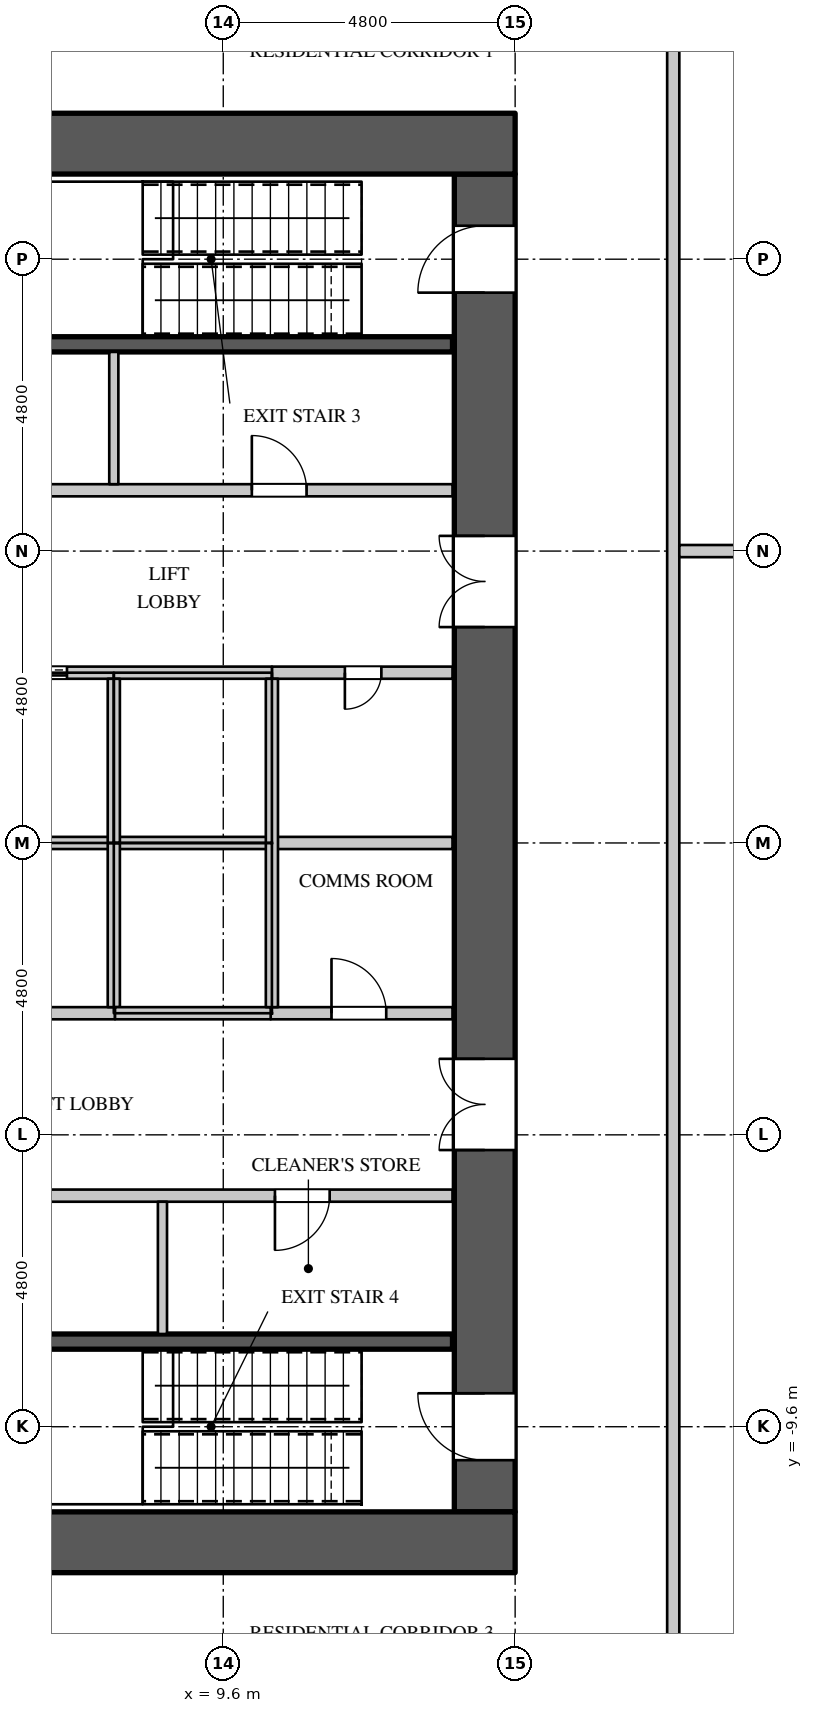
"""IFC4 building model, lengths in metres.
Left out: names, types, materials, properties, quantities, classifications, styles, units other than length and angle.
Written with IfcOpenShell. Run it as: python <this file> out.ifc"""

import sys

from ifc_helpers import new_model, si_unit, direction, frame, frame_2d, origin, place, context, subcontext, project, spatial, rectangle, extrude, element, fill, save


model = new_model("IFC4")
c1 = context("Model", 3, precision=1e-05, world=origin(), true_north=direction((0.0, 1.0)))
c2 = subcontext(c1, "Body", "Model", "MODEL_VIEW")
j1 = project(units=[si_unit("LENGTHUNIT", "METRE"), si_unit("PLANEANGLEUNIT", "RADIAN")], contexts=[c1])
p1 = place(None, origin())
s1 = spatial("IfcSite", under=j1, at=p1, CompositionType="ELEMENT")
p2 = place(p1, origin())
s2 = spatial("IfcBuilding", under=s1, at=p2, CompositionType="ELEMENT")
p3 = place(p2, frame((0.0, 0.0, 80.1)))
s3 = spatial("IfcBuildingStorey", under=s2, at=p3, CompositionType="ELEMENT", Elevation=80.1)
for number, where, z_axis, x_axis in (
    (1, (-14.4, 11.5, 0.0), (0.0, 0.0, 1.0), (1.0, 0.0, 0.0)),
    (2, (-14.4, -11.5, 0.0), (0.0, 0.0, 1.0), (1.0, 0.0, 0.0)),
):
    element("IfcWall", number, at=place(p3, frame(where, z_axis=z_axis, x_axis=x_axis)), inside=s3, PredefinedType="SHEAR", context=c2, shape_type="SweptSolid", body=[
        extrude(rectangle(XDim=28.8, YDim=1.0, at=frame_2d((14.4, 0.0))), origin(), (0.0, 0.0, 1.0), 4.2),
    ])
p4 = place(p3, frame((13.9, -11.0, 0.0), z_axis=(0.0, 0.0, 1.0), x_axis=(0.0, 1.0, 0.0)))
e3 = element("IfcWall", 3, at=p4, inside=s3, PredefinedType="SHEAR", context=c2, shape_type="SweptSolid", body=[
    extrude(rectangle(XDim=22.0, YDim=1.0, at=frame_2d((11.0, 0.0))), origin(), (0.0, 0.0, 1.0), 4.2),
])
p5 = place(p4, frame((20.05, 0.0, 0.0)))
e4 = element("IfcOpeningElement", 4, at=p5, cuts=e3, PredefinedType="OPENING", context=c2, shape_type="SweptSolid", body=[
    extrude(rectangle(XDim=1.1, YDim=2.2, at=frame_2d((0.55, 1.1))), frame((0.0, 0.51, 0.0), z_axis=(0.0, -1.0, 0.0), x_axis=(1.0, 0.0, 0.0)), (0.0, 0.0, 1.0), 1.02),
])
p6 = place(p4, frame((0.85, 0.0, 0.0)))
e5 = element("IfcOpeningElement", 5, at=p6, cuts=e3, PredefinedType="OPENING", context=c2, shape_type="SweptSolid", body=[
    extrude(rectangle(XDim=1.1, YDim=2.2, at=frame_2d((0.55, 1.1))), frame((0.0, 0.51, 0.0), z_axis=(0.0, -1.0, 0.0), x_axis=(1.0, 0.0, 0.0)), (0.0, 0.0, 1.0), 1.02),
])
p7 = place(p4, frame((14.55, 0.0, 0.0)))
e6 = element("IfcOpeningElement", 6, at=p7, cuts=e3, PredefinedType="OPENING", context=c2, shape_type="SweptSolid", body=[
    extrude(rectangle(XDim=1.5, YDim=2.4, at=frame_2d((0.75, 1.2))), frame((0.0, 0.51, 0.0), z_axis=(0.0, -1.0, 0.0), x_axis=(1.0, 0.0, 0.0)), (0.0, 0.0, 1.0), 1.02),
])
p8 = place(p4, frame((5.95, 0.0, 0.0)))
e7 = element("IfcOpeningElement", 7, at=p8, cuts=e3, PredefinedType="OPENING", context=c2, shape_type="SweptSolid", body=[
    extrude(rectangle(XDim=1.5, YDim=2.4, at=frame_2d((0.75, 1.2))), frame((0.0, 0.51, 0.0), z_axis=(0.0, -1.0, 0.0), x_axis=(1.0, 0.0, 0.0)), (0.0, 0.0, 1.0), 1.02),
])
p9 = place(p3, frame((-7.7, -5.8, 0.0), z_axis=(0.0, 0.0, 1.0), x_axis=(1.0, 0.0, 0.0)))
e8 = element("IfcWall", 8, at=p9, inside=s3, PredefinedType="PARTITIONING", context=c2, shape_type="SweptSolid", body=[
    extrude(rectangle(XDim=21.07, YDim=0.2, at=frame_2d((10.535, 0.0))), origin(), (0.0, 0.0, 1.0), 3.95),
])
p10 = place(p9, frame((1.35, 0.0, 0.0)))
e9 = element("IfcOpeningElement", 9, at=p10, cuts=e8, PredefinedType="OPENING", context=c2, shape_type="SweptSolid", body=[
    extrude(rectangle(XDim=0.9, YDim=2.2, at=frame_2d((0.45, 1.1))), frame((0.0, 0.11, 0.0), z_axis=(0.0, -1.0, 0.0), x_axis=(1.0, 0.0, 0.0)), (0.0, 0.0, 1.0), 0.22),
])
p11 = place(p9, frame((5.75, 0.0, 0.0)))
e10 = element("IfcOpeningElement", 10, at=p11, cuts=e8, PredefinedType="OPENING", context=c2, shape_type="SweptSolid", body=[
    extrude(rectangle(XDim=0.9, YDim=2.2, at=frame_2d((0.45, 1.1))), frame((0.0, 0.11, 0.0), z_axis=(0.0, -1.0, 0.0), x_axis=(1.0, 0.0, 0.0)), (0.0, 0.0, 1.0), 0.22),
])
p12 = place(p9, frame((12.1, 0.0, 0.0)))
e11 = element("IfcOpeningElement", 11, at=p12, cuts=e8, PredefinedType="OPENING", context=c2, shape_type="SweptSolid", body=[
    extrude(rectangle(XDim=0.9, YDim=2.2, at=frame_2d((0.45, 1.1))), frame((0.0, 0.11, 0.0), z_axis=(0.0, -1.0, 0.0), x_axis=(1.0, 0.0, 0.0)), (0.0, 0.0, 1.0), 0.22),
])
p13 = place(p9, frame((18.15, 0.0, 0.0)))
e12 = element("IfcOpeningElement", 12, at=p13, cuts=e8, PredefinedType="OPENING", context=c2, shape_type="SweptSolid", body=[
    extrude(rectangle(XDim=0.9, YDim=2.2, at=frame_2d((0.45, 1.1))), frame((0.0, 0.11, 0.0), z_axis=(0.0, -1.0, 0.0), x_axis=(1.0, 0.0, 0.0)), (0.0, 0.0, 1.0), 0.22),
])
p14 = place(p3, frame((-1.62, -2.8, 0.0), z_axis=(0.0, 0.0, 1.0), x_axis=(1.0, 0.0, 0.0)))
e13 = element("IfcWall", 13, at=p14, inside=s3, PredefinedType="PARTITIONING", context=c2, shape_type="SweptSolid", body=[
    extrude(rectangle(XDim=9.44, YDim=0.2, at=frame_2d((4.72, 0.0))), origin(), (0.0, 0.0, 1.0), 3.95),
])
p15 = place(p14, frame((4.25, 0.0, 0.0)))
e14 = element("IfcOpeningElement", 14, at=p15, cuts=e13, PredefinedType="OPENING", context=c2, shape_type="SweptSolid", body=[
    extrude(rectangle(XDim=0.9, YDim=2.2, at=frame_2d((0.45, 1.1))), frame((0.0, 0.11, 0.0), z_axis=(0.0, -1.0, 0.0), x_axis=(1.0, 0.0, 0.0)), (0.0, 0.0, 1.0), 0.22),
])
p16 = place(p3, frame((4.62, 5.8, 0.0), z_axis=(0.0, 0.0, 1.0), x_axis=(1.0, 0.0, 0.0)))
e15 = element("IfcWall", 15, at=p16, inside=s3, PredefinedType="PARTITIONING", context=c2, shape_type="SweptSolid", body=[
    extrude(rectangle(XDim=8.75, YDim=0.2, at=frame_2d((4.375, 0.0))), origin(), (0.0, 0.0, 1.0), 3.95),
])
p17 = place(p16, frame((1.2, 0.0, 0.0)))
e16 = element("IfcOpeningElement", 16, at=p17, cuts=e15, PredefinedType="OPENING", context=c2, shape_type="SweptSolid", body=[
    extrude(rectangle(XDim=0.9, YDim=2.2, at=frame_2d((0.45, 1.1))), frame((0.0, 0.11, 0.0), z_axis=(0.0, -1.0, 0.0), x_axis=(1.0, 0.0, 0.0)), (0.0, 0.0, 1.0), 0.22),
])
p18 = place(p16, frame((5.45, 0.0, 0.0)))
e17 = element("IfcOpeningElement", 17, at=p18, cuts=e15, PredefinedType="OPENING", context=c2, shape_type="SweptSolid", body=[
    extrude(rectangle(XDim=0.9, YDim=2.2, at=frame_2d((0.45, 1.1))), frame((0.0, 0.11, 0.0), z_axis=(0.0, -1.0, 0.0), x_axis=(1.0, 0.0, 0.0)), (0.0, 0.0, 1.0), 0.22),
])
p19 = place(p3, frame((17.0, -14.5, 0.0), z_axis=(0.0, 0.0, 1.0), x_axis=(0.0, 1.0, 0.0)))
e18 = element("IfcWall", 18, at=p19, inside=s3, PredefinedType="PARTITIONING", context=c2, shape_type="SweptSolid", body=[
    extrude(rectangle(XDim=29.0, YDim=0.2, at=frame_2d((14.5, 0.0))), origin(), (0.0, 0.0, 1.0), 3.95),
])
for number, where, z_axis, x_axis in (
    (19, (7.8, 5.9, 0.0), (0.0, 0.0, 1.0), (0.0, 1.0, 0.0)),
    (20, (8.6, -8.075, 0.0), (0.0, 0.0, 1.0), (0.0, 1.0, 0.0)),
):
    element("IfcWall", number, at=place(p3, frame(where, z_axis=z_axis, x_axis=x_axis)), inside=s3, PredefinedType="PARTITIONING", context=c2, shape_type="SweptSolid", body=[
        extrude(rectangle(XDim=2.175, YDim=0.15, at=frame_2d((1.087, 0.0))), origin(), (0.0, 0.0, 1.0), 3.95),
    ])
p20 = place(p3, frame((16.02, -19.26, 0.0), z_axis=(0.0, 0.0, 1.0), x_axis=(0.707106781187, 0.707106781187, 0.0)))
e21 = element("IfcWall", 21, at=p20, inside=s3, PredefinedType="PARTITIONING", context=c2, shape_type="SweptSolid", body=[
    extrude(rectangle(XDim=10.229, YDim=0.15, at=frame_2d((5.114, 0.0))), origin(), (0.0, 0.0, 1.0), 3.95),
])
p21 = place(p20, frame((4.3, 0.0, 0.0)))
e22 = element("IfcOpeningElement", 22, at=p21, cuts=e21, PredefinedType="OPENING", context=c2, shape_type="SweptSolid", body=[
    extrude(rectangle(XDim=0.95, YDim=2.2, at=frame_2d((0.475, 1.1))), frame((0.0, 0.085, 0.0), z_axis=(0.0, -1.0, 0.0), x_axis=(1.0, 0.0, 0.0)), (0.0, 0.0, 1.0), 0.17),
])
p22 = place(p20, frame((0.6, 0.0, 0.0)))
e23 = element("IfcOpeningElement", 23, at=p22, cuts=e21, PredefinedType="OPENING", context=c2, shape_type="SweptSolid", body=[
    extrude(rectangle(XDim=0.95, YDim=2.2, at=frame_2d((0.475, 1.1))), frame((0.0, 0.085, 0.0), z_axis=(0.0, -1.0, 0.0), x_axis=(1.0, 0.0, 0.0)), (0.0, 0.0, 1.0), 0.17),
])
p23 = place(p20, frame((9.1, 0.0, 0.0)))
e24 = element("IfcOpeningElement", 24, at=p23, cuts=e21, PredefinedType="OPENING", context=c2, shape_type="SweptSolid", body=[
    extrude(rectangle(XDim=0.95, YDim=2.2, at=frame_2d((0.475, 1.1))), frame((0.0, 0.085, 0.0), z_axis=(0.0, -1.0, 0.0), x_axis=(1.0, 0.0, 0.0)), (0.0, 0.0, 1.0), 0.17),
])
p24 = place(p3, frame((17.552, 17.446, 0.0), z_axis=(0.0, 0.0, 1.0), x_axis=(0.707106781187, -0.707106781187, 0.0)))
e25 = element("IfcWall", 25, at=p24, inside=s3, PredefinedType="PARTITIONING", context=c2, shape_type="SweptSolid", body=[
    extrude(rectangle(XDim=7.78, YDim=0.15, at=frame_2d((3.89, 0.0))), origin(), (0.0, 0.0, 1.0), 3.95),
])
p25 = place(p24, frame((2.05, 0.0, 0.0)))
e26 = element("IfcOpeningElement", 26, at=p25, cuts=e25, PredefinedType="OPENING", context=c2, shape_type="SweptSolid", body=[
    extrude(rectangle(XDim=0.95, YDim=2.2, at=frame_2d((0.475, 1.1))), frame((0.0, 0.085, 0.0), z_axis=(0.0, -1.0, 0.0), x_axis=(1.0, 0.0, 0.0)), (0.0, 0.0, 1.0), 0.17),
])
p26 = place(p24, frame((6.65, 0.0, 0.0)))
e27 = element("IfcOpeningElement", 27, at=p26, cuts=e25, PredefinedType="OPENING", context=c2, shape_type="SweptSolid", body=[
    extrude(rectangle(XDim=0.95, YDim=2.2, at=frame_2d((0.475, 1.1))), frame((0.0, 0.085, 0.0), z_axis=(0.0, -1.0, 0.0), x_axis=(1.0, 0.0, 0.0)), (0.0, 0.0, 1.0), 0.17),
])
p27 = place(p3, frame((17.1, 4.8, 0.0), z_axis=(0.0, 0.0, 1.0), x_axis=(1.0, 0.0, 0.0)))
e28 = element("IfcWall", 28, at=p27, inside=s3, PredefinedType="PARTITIONING", context=c2, shape_type="SweptSolid", body=[
    extrude(rectangle(XDim=10.8, YDim=0.2, at=frame_2d((5.4, 0.0))), origin(), (0.0, 0.0, 1.0), 3.25),
])
p28 = place(p3, frame((10.38, -2.8, 0.0), z_axis=(0.0, 0.0, 1.0), x_axis=(1.0, 0.0, 0.0)))
e29 = element("IfcWall", 29, at=p28, inside=s3, PredefinedType="PARTITIONING", context=c2, shape_type="SweptSolid", body=[
    extrude(rectangle(XDim=2.99, YDim=0.2, at=frame_2d((1.495, 0.0))), origin(), (0.0, 0.0, 1.0), 3.95),
])
p29 = place(p28, frame((1.0, 0.0, 0.0)))
e30 = element("IfcOpeningElement", 30, at=p29, cuts=e29, PredefinedType="OPENING", context=c2, shape_type="SweptSolid", body=[
    extrude(rectangle(XDim=0.9, YDim=2.2, at=frame_2d((0.45, 1.1))), frame((0.0, 0.11, 0.0), z_axis=(0.0, -1.0, 0.0), x_axis=(1.0, 0.0, 0.0)), (0.0, 0.0, 1.0), 0.22),
])
p30 = place(p3, frame((10.4, 2.8, 0.0), z_axis=(0.0, 0.0, 1.0), x_axis=(1.0, 0.0, 0.0)))
e31 = element("IfcWall", 31, at=p30, inside=s3, PredefinedType="PARTITIONING", context=c2, shape_type="SweptSolid", body=[
    extrude(rectangle(XDim=2.97, YDim=0.2, at=frame_2d((1.485, 0.0))), origin(), (0.0, 0.0, 1.0), 3.95),
])
p31 = place(p30, frame((1.2, 0.0, 0.0)))
e32 = element("IfcOpeningElement", 32, at=p31, cuts=e31, PredefinedType="OPENING", context=c2, shape_type="SweptSolid", body=[
    extrude(rectangle(XDim=0.6, YDim=2.0, at=frame_2d((0.3, 1.0))), frame((0.0, 0.11, 0.0), z_axis=(0.0, -1.0, 0.0), x_axis=(1.0, 0.0, 0.0)), (0.0, 0.0, 1.0), 0.22),
])
p32 = place(p3, frame((10.4, 0.0, 0.0), z_axis=(0.0, 0.0, 1.0), x_axis=(1.0, 0.0, 0.0)))
e33 = element("IfcWall", 33, at=p32, inside=s3, PredefinedType="PARTITIONING", context=c2, shape_type="SweptSolid", body=[
    extrude(rectangle(XDim=2.97, YDim=0.2, at=frame_2d((1.485, 0.0))), origin(), (0.0, 0.0, 1.0), 3.95),
])
p33 = place(p3, frame((-13.37, 0.0, 0.0), z_axis=(0.0, 0.0, 1.0), x_axis=(1.0, 0.0, 0.0)))
e34 = element("IfcWall", 34, at=p33, inside=s3, PredefinedType="PARTITIONING", context=c2, shape_type="SweptSolid", body=[
    extrude(rectangle(XDim=23.77, YDim=0.2, at=frame_2d((11.885, 0.0))), origin(), (0.0, 0.0, 1.0), 3.95),
])
p34 = place(p3, frame((-13.37, 2.8, 0.0), z_axis=(0.0, 0.0, 1.0), x_axis=(1.0, 0.0, 0.0)))
e35 = element("IfcWall", 35, at=p34, inside=s3, PredefinedType="PARTITIONING", context=c2, shape_type="SweptSolid", body=[
    extrude(rectangle(XDim=23.77, YDim=0.2, at=frame_2d((11.885, 0.0))), origin(), (0.0, 0.0, 1.0), 3.95),
])
p35 = place(p34, frame((0.9, 0.0, 0.0)))
e36 = element("IfcOpeningElement", 36, at=p35, cuts=e35, PredefinedType="OPENING", context=c2, shape_type="SweptSolid", body=[
    extrude(rectangle(XDim=1.1, YDim=2.2, at=frame_2d((0.55, 1.1))), frame((0.0, 0.11, 0.0), z_axis=(0.0, -1.0, 0.0), x_axis=(1.0, 0.0, 0.0)), (0.0, 0.0, 1.0), 0.22),
])
p36 = place(p34, frame((3.7, 0.0, 0.0)))
e37 = element("IfcOpeningElement", 37, at=p36, cuts=e35, PredefinedType="OPENING", context=c2, shape_type="SweptSolid", body=[
    extrude(rectangle(XDim=1.1, YDim=2.2, at=frame_2d((0.55, 1.1))), frame((0.0, 0.11, 0.0), z_axis=(0.0, -1.0, 0.0), x_axis=(1.0, 0.0, 0.0)), (0.0, 0.0, 1.0), 0.22),
])
p37 = place(p34, frame((6.3, 0.0, 0.0)))
e38 = element("IfcOpeningElement", 38, at=p37, cuts=e35, PredefinedType="OPENING", context=c2, shape_type="SweptSolid", body=[
    extrude(rectangle(XDim=1.1, YDim=2.2, at=frame_2d((0.55, 1.1))), frame((0.0, 0.11, 0.0), z_axis=(0.0, -1.0, 0.0), x_axis=(1.0, 0.0, 0.0)), (0.0, 0.0, 1.0), 0.22),
])
p38 = place(p34, frame((8.9, 0.0, 0.0)))
e39 = element("IfcOpeningElement", 39, at=p38, cuts=e35, PredefinedType="OPENING", context=c2, shape_type="SweptSolid", body=[
    extrude(rectangle(XDim=1.1, YDim=2.2, at=frame_2d((0.55, 1.1))), frame((0.0, 0.11, 0.0), z_axis=(0.0, -1.0, 0.0), x_axis=(1.0, 0.0, 0.0)), (0.0, 0.0, 1.0), 0.22),
])
p39 = place(p34, frame((11.5, 0.0, 0.0)))
e40 = element("IfcOpeningElement", 40, at=p39, cuts=e35, PredefinedType="OPENING", context=c2, shape_type="SweptSolid", body=[
    extrude(rectangle(XDim=1.1, YDim=2.2, at=frame_2d((0.55, 1.1))), frame((0.0, 0.11, 0.0), z_axis=(0.0, -1.0, 0.0), x_axis=(1.0, 0.0, 0.0)), (0.0, 0.0, 1.0), 0.22),
])
p40 = place(p34, frame((14.1, 0.0, 0.0)))
e41 = element("IfcOpeningElement", 41, at=p40, cuts=e35, PredefinedType="OPENING", context=c2, shape_type="SweptSolid", body=[
    extrude(rectangle(XDim=1.1, YDim=2.2, at=frame_2d((0.55, 1.1))), frame((0.0, 0.11, 0.0), z_axis=(0.0, -1.0, 0.0), x_axis=(1.0, 0.0, 0.0)), (0.0, 0.0, 1.0), 0.22),
])
p41 = place(p34, frame((16.7, 0.0, 0.0)))
e42 = element("IfcOpeningElement", 42, at=p41, cuts=e35, PredefinedType="OPENING", context=c2, shape_type="SweptSolid", body=[
    extrude(rectangle(XDim=1.1, YDim=2.2, at=frame_2d((0.55, 1.1))), frame((0.0, 0.11, 0.0), z_axis=(0.0, -1.0, 0.0), x_axis=(1.0, 0.0, 0.0)), (0.0, 0.0, 1.0), 0.22),
])
p42 = place(p34, frame((19.3, 0.0, 0.0)))
e43 = element("IfcOpeningElement", 43, at=p42, cuts=e35, PredefinedType="OPENING", context=c2, shape_type="SweptSolid", body=[
    extrude(rectangle(XDim=1.1, YDim=2.2, at=frame_2d((0.55, 1.1))), frame((0.0, 0.11, 0.0), z_axis=(0.0, -1.0, 0.0), x_axis=(1.0, 0.0, 0.0)), (0.0, 0.0, 1.0), 0.22),
])
p43 = place(p3, frame((7.8, -2.7, 0.0), z_axis=(0.0, 0.0, 1.0), x_axis=(0.0, 1.0, 0.0)))
e44 = element("IfcWall", 44, at=p43, inside=s3, PredefinedType="PARTITIONING", context=c2, shape_type="SweptSolid", body=[
    extrude(rectangle(XDim=2.7, YDim=0.2, at=frame_2d((1.35, 0.0))), origin(), (0.0, 0.0, 1.0), 3.95),
])
p44 = place(p3, frame((7.82, -2.8, 0.0), z_axis=(0.0, 0.0, 1.0), x_axis=(1.0, 0.0, 0.0)))
e45 = element("IfcWall", 45, at=p44, inside=s3, PredefinedType="PARTITIONING", context=c2, shape_type="SweptSolid", body=[
    extrude(rectangle(XDim=2.56, YDim=0.2, at=frame_2d((1.28, 0.0))), origin(), (0.0, 0.0, 1.0), 3.95),
])
p45 = place(p3, frame((7.8, 0.0, 0.0), z_axis=(0.0, 0.0, 1.0), x_axis=(0.0, 1.0, 0.0)))
e46 = element("IfcWall", 46, at=p45, inside=s3, PredefinedType="PARTITIONING", context=c2, shape_type="SweptSolid", body=[
    extrude(rectangle(XDim=2.7, YDim=0.2, at=frame_2d((1.35, 0.0))), origin(), (0.0, 0.0, 1.0), 3.95),
])
p46 = place(p3, frame((10.4, -2.7, 0.0), z_axis=(0.0, 0.0, 1.0), x_axis=(0.0, 1.0, 0.0)))
e47 = element("IfcWall", 47, at=p46, inside=s3, PredefinedType="PARTITIONING", context=c2, shape_type="SweptSolid", body=[
    extrude(rectangle(XDim=5.4, YDim=0.2, at=frame_2d((2.7, 0.0))), origin(), (0.0, 0.0, 1.0), 3.95),
])
for number, where, z_axis, x_axis in (
    (48, (5.275, -8.2, 0.0), (0.0, 0.0, 1.0), (1.0, 0.0, 0.0)),
    (49, (5.275, 8.2, 0.0), (0.0, 0.0, 1.0), (1.0, 0.0, 0.0)),
):
    element("IfcWall", number, at=place(p3, frame(where, z_axis=z_axis, x_axis=x_axis)), inside=s3, PredefinedType="SHEAR", context=c2, shape_type="SweptSolid", body=[
        extrude(rectangle(XDim=8.095, YDim=0.25, at=frame_2d((4.048, 0.0))), origin(), (0.0, 0.0, 1.0), 3.95),
    ])
p47 = place(p31, origin())
e50 = element("IfcDoor", 50, at=p47, inside=s3, OperationType="SINGLE_SWING_RIGHT", PredefinedType="DOOR", context=c2, shape_type="SweptSolid", body=[
    extrude(rectangle(XDim=0.6, YDim=2.0, at=frame_2d((0.3, 1.0))), frame((0.0, 0.025, 0.0), z_axis=(0.0, -1.0, 0.0), x_axis=(1.0, 0.0, 0.0)), (0.0, 0.0, 1.0), 0.05),
])
fill(e32, e50)
p48 = place(p29, origin())
e51 = element("IfcDoor", 51, at=p48, inside=s3, OperationType="SINGLE_SWING_LEFT", PredefinedType="DOOR", context=c2, shape_type="SweptSolid", body=[
    extrude(rectangle(XDim=0.9, YDim=2.2, at=frame_2d((0.45, 1.1))), frame((0.0, 0.025, 0.0), z_axis=(0.0, -1.0, 0.0), x_axis=(1.0, 0.0, 0.0)), (0.0, 0.0, 1.0), 0.05),
])
fill(e30, e51)
p49 = place(p18, origin())
e52 = element("IfcDoor", 52, at=p49, inside=s3, OperationType="SINGLE_SWING_LEFT", PredefinedType="DOOR", context=c2, shape_type="SweptSolid", body=[
    extrude(rectangle(XDim=0.9, YDim=2.2, at=frame_2d((0.45, 1.1))), frame((0.0, 0.025, 0.0), z_axis=(0.0, -1.0, 0.0), x_axis=(1.0, 0.0, 0.0)), (0.0, 0.0, 1.0), 0.05),
])
fill(e17, e52)
p50 = place(p13, origin())
e53 = element("IfcDoor", 53, at=p50, inside=s3, OperationType="SINGLE_SWING_RIGHT", PredefinedType="DOOR", context=c2, shape_type="SweptSolid", body=[
    extrude(rectangle(XDim=0.9, YDim=2.2, at=frame_2d((0.45, 1.1))), frame((0.0, 0.025, 0.0), z_axis=(0.0, -1.0, 0.0), x_axis=(1.0, 0.0, 0.0)), (0.0, 0.0, 1.0), 0.05),
])
fill(e12, e53)
p51 = place(p42, origin())
e54 = element("IfcDoor", 54, at=p51, inside=s3, OperationType="DOUBLE_DOOR_SLIDING", PredefinedType="DOOR", context=c2, shape_type="SweptSolid", body=[
    extrude(rectangle(XDim=1.1, YDim=2.2, at=frame_2d((0.55, 1.1))), frame((0.0, 0.025, 0.0), z_axis=(0.0, -1.0, 0.0), x_axis=(1.0, 0.0, 0.0)), (0.0, 0.0, 1.0), 0.05),
])
fill(e43, e54)
p52 = place(p5, origin())
e55 = element("IfcDoor", 55, at=p52, inside=s3, OperationType="SINGLE_SWING_LEFT", PredefinedType="DOOR", context=c2, shape_type="SweptSolid", body=[
    extrude(rectangle(XDim=1.1, YDim=2.2, at=frame_2d((0.55, 1.1))), frame((0.0, 0.495, 0.0), z_axis=(0.0, -1.0, 0.0), x_axis=(1.0, 0.0, 0.0)), (0.0, 0.0, 1.0), 0.05),
])
fill(e4, e55)
p53 = place(p6, origin())
e56 = element("IfcDoor", 56, at=p53, inside=s3, OperationType="SINGLE_SWING_RIGHT", PredefinedType="DOOR", context=c2, shape_type="SweptSolid", body=[
    extrude(rectangle(XDim=1.1, YDim=2.2, at=frame_2d((0.55, 1.1))), frame((0.0, 0.495, 0.0), z_axis=(0.0, -1.0, 0.0), x_axis=(1.0, 0.0, 0.0)), (0.0, 0.0, 1.0), 0.05),
])
fill(e5, e56)
p54 = place(p7, origin())
e57 = element("IfcDoor", 57, at=p54, inside=s3, OperationType="DOUBLE_DOOR_SINGLE_SWING", PredefinedType="DOOR", context=c2, shape_type="SweptSolid", body=[
    extrude(rectangle(XDim=1.5, YDim=2.4, at=frame_2d((0.75, 1.2))), frame((0.0, 0.495, 0.0), z_axis=(0.0, -1.0, 0.0), x_axis=(1.0, 0.0, 0.0)), (0.0, 0.0, 1.0), 0.05),
])
fill(e6, e57)
p55 = place(p8, origin())
e58 = element("IfcDoor", 58, at=p55, inside=s3, OperationType="DOUBLE_DOOR_SINGLE_SWING", PredefinedType="DOOR", context=c2, shape_type="SweptSolid", body=[
    extrude(rectangle(XDim=1.5, YDim=2.4, at=frame_2d((0.75, 1.2))), frame((0.0, 0.495, 0.0), z_axis=(0.0, -1.0, 0.0), x_axis=(1.0, 0.0, 0.0)), (0.0, 0.0, 1.0), 0.05),
])
fill(e7, e58)
save(model, sys.argv[1])
